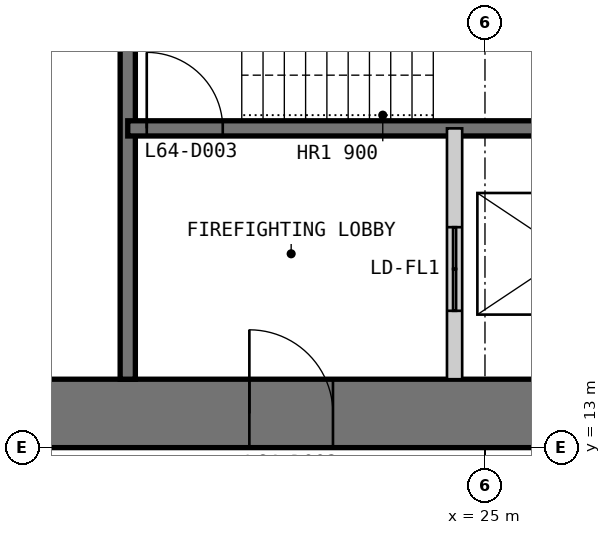
"""IFC4 building model, lengths in metres.
Left out: names, types, materials, properties, quantities, classifications, styles, units other than length and angle.
Written with IfcOpenShell. Run it as: python <this file> out.ifc"""

import sys

from ifc_helpers import new_model, si_unit, direction, frame, frame_2d, origin, place, context, subcontext, project, spatial, polyline, rectangle, outline, extrude, element, fill, save


model = new_model("IFC4")
c1 = context("Model", 3, precision=1e-05, world=origin(), true_north=direction((0.0, 1.0)))
c2 = subcontext(c1, "Body", "Model", "MODEL_VIEW")
j1 = project(units=[si_unit("LENGTHUNIT", "METRE"), si_unit("PLANEANGLEUNIT", "RADIAN")], contexts=[c1])
p1 = place(None, origin())
s1 = spatial("IfcSite", under=j1, at=p1, CompositionType="ELEMENT")
p2 = place(p1, origin())
s2 = spatial("IfcBuilding", under=s1, at=p2, CompositionType="ELEMENT")
p3 = place(p2, frame((0.0, 0.0, 269.6)))
s3 = spatial("IfcBuildingStorey", under=s2, at=p3, CompositionType="ELEMENT", Elevation=269.6)
p4 = place(p3, frame((13.0, 13.45, 0.0), z_axis=(0.0, 0.0, 1.0), x_axis=(1.0, 0.0, 0.0)))
e1 = element("IfcWall", 1, at=p4, inside=s3, PredefinedType="SHEAR", context=c2, shape_type="SweptSolid", body=[
    extrude(outline(polyline([(0.0, -0.45), (24.0, -0.45), (23.1, 0.45), (0.9, 0.45), (0.0, -0.45)])), origin(), (0.0, 0.0, 1.0), 3.4),
])
p5 = place(p4, frame((4.9, 0.0, 0.0)))
e2 = element("IfcOpeningElement", 2, at=p5, cuts=e1, PredefinedType="OPENING", context=c2, shape_type="SweptSolid", body=[
    extrude(rectangle(XDim=1.0, YDim=2.2, at=frame_2d((0.5, 1.1))), frame((0.0, 0.46, 0.0), z_axis=(0.0, -1.0, 0.0), x_axis=(1.0, 0.0, 0.0)), (0.0, 0.0, 1.0), 0.92),
])
p6 = place(p4, frame((8.9, 0.0, 0.0)))
e3 = element("IfcOpeningElement", 3, at=p6, cuts=e1, PredefinedType="OPENING", context=c2, shape_type="SweptSolid", body=[
    extrude(rectangle(XDim=1.1, YDim=2.2, at=frame_2d((0.55, 1.1))), frame((0.0, 0.46, 0.0), z_axis=(0.0, -1.0, 0.0), x_axis=(1.0, 0.0, 0.0)), (0.0, 0.0, 1.0), 0.92),
])
p7 = place(p4, frame((15.05, 0.0, 0.0)))
e4 = element("IfcOpeningElement", 4, at=p7, cuts=e1, PredefinedType="OPENING", context=c2, shape_type="SweptSolid", body=[
    extrude(rectangle(XDim=0.9, YDim=2.2, at=frame_2d((0.45, 1.1))), frame((0.0, 0.46, 0.0), z_axis=(0.0, -1.0, 0.0), x_axis=(1.0, 0.0, 0.0)), (0.0, 0.0, 1.0), 0.92),
])
p8 = place(p4, frame((17.9, 0.0, 0.0)))
e5 = element("IfcOpeningElement", 5, at=p8, cuts=e1, PredefinedType="OPENING", context=c2, shape_type="SweptSolid", body=[
    extrude(rectangle(XDim=1.0, YDim=2.2, at=frame_2d((0.5, 1.1))), frame((0.0, 0.46, 0.0), z_axis=(0.0, -1.0, 0.0), x_axis=(1.0, 0.0, 0.0)), (0.0, 0.0, 1.0), 0.92),
])
p9 = place(p4, frame((21.4, 0.0, 0.0)))
e6 = element("IfcOpeningElement", 6, at=p9, cuts=e1, PredefinedType="OPENING", context=c2, shape_type="SweptSolid", body=[
    extrude(rectangle(XDim=1.0, YDim=2.2, at=frame_2d((0.5, 1.1))), frame((0.0, 0.46, 0.0), z_axis=(0.0, -1.0, 0.0), x_axis=(1.0, 0.0, 0.0)), (0.0, 0.0, 1.0), 0.92),
])
p10 = place(p3, frame((20.3, 13.9, 0.0), z_axis=(0.0, 0.0, 1.0), x_axis=(0.0, 1.0, 0.0)))
e7 = element("IfcWall", 7, at=p10, inside=s3, PredefinedType="SOLIDWALL", context=c2, shape_type="SweptSolid", body=[
    extrude(rectangle(XDim=16.1, YDim=0.2, at=frame_2d((8.05, 0.0))), origin(), (0.0, 0.0, 1.0), 3.2),
])
p11 = place(p10, frame((7.85, 0.0, 0.0)))
e8 = element("IfcOpeningElement", 8, at=p11, cuts=e7, PredefinedType="OPENING", context=c2, shape_type="SweptSolid", body=[
    extrude(rectangle(XDim=0.9, YDim=2.2, at=frame_2d((0.45, 1.1))), frame((0.0, 0.11, 0.0), z_axis=(0.0, -1.0, 0.0), x_axis=(1.0, 0.0, 0.0)), (0.0, 0.0, 1.0), 0.22),
])
p12 = place(p10, frame((11.75, 0.0, 0.0)))
e9 = element("IfcOpeningElement", 9, at=p12, cuts=e7, PredefinedType="OPENING", context=c2, shape_type="SweptSolid", body=[
    extrude(rectangle(XDim=0.9, YDim=2.2, at=frame_2d((0.45, 1.1))), frame((0.0, 0.11, 0.0), z_axis=(0.0, -1.0, 0.0), x_axis=(1.0, 0.0, 0.0)), (0.0, 0.0, 1.0), 0.22),
])
p13 = place(p10, frame((14.5, 0.0, 0.0)))
e10 = element("IfcOpeningElement", 10, at=p13, cuts=e7, PredefinedType="OPENING", context=c2, shape_type="SweptSolid", body=[
    extrude(rectangle(XDim=1.0, YDim=2.2, at=frame_2d((0.5, 1.1))), frame((0.0, 0.11, 0.0), z_axis=(0.0, -1.0, 0.0), x_axis=(1.0, 0.0, 0.0)), (0.0, 0.0, 1.0), 0.22),
])
p14 = place(p3, frame((20.3, 17.2, 0.0), z_axis=(0.0, 0.0, 1.0), x_axis=(1.0, 0.0, 0.0)))
e11 = element("IfcWall", 11, at=p14, inside=s3, PredefinedType="SOLIDWALL", context=c2, shape_type="SweptSolid", body=[
    extrude(rectangle(XDim=9.4, YDim=0.2, at=frame_2d((4.7, 0.0))), origin(), (0.0, 0.0, 1.0), 3.2),
])
p15 = place(p14, frame((0.25, 0.0, 0.0)))
e12 = element("IfcOpeningElement", 12, at=p15, cuts=e11, PredefinedType="OPENING", context=c2, shape_type="SweptSolid", body=[
    extrude(rectangle(XDim=1.0, YDim=2.2, at=frame_2d((0.5, 1.1))), frame((0.0, 0.11, 0.0), z_axis=(0.0, -1.0, 0.0), x_axis=(1.0, 0.0, 0.0)), (0.0, 0.0, 1.0), 0.22),
])
p16 = place(p3, frame((24.6, 13.9, 0.0), z_axis=(0.0, 0.0, 1.0), x_axis=(0.0, 1.0, 0.0)))
e13 = element("IfcWall", 13, at=p16, inside=s3, PredefinedType="PARTITIONING", context=c2, shape_type="SweptSolid", body=[
    extrude(rectangle(XDim=3.3, YDim=0.2, at=frame_2d((1.65, 0.0))), origin(), (0.0, 0.0, 1.0), 3.2),
])
p17 = place(p16, frame((0.9, 0.0, 0.0)))
e14 = element("IfcOpeningElement", 14, at=p17, cuts=e13, PredefinedType="OPENING", context=c2, shape_type="SweptSolid", body=[
    extrude(rectangle(XDim=1.1, YDim=2.2, at=frame_2d((0.55, 1.1))), frame((0.0, 0.11, 0.0), z_axis=(0.0, -1.0, 0.0), x_axis=(1.0, 0.0, 0.0)), (0.0, 0.0, 1.0), 0.22),
])
p18 = place(p6, origin())
e15 = element("IfcDoor", 15, at=p18, inside=s3, OperationType="SINGLE_SWING_LEFT", PredefinedType="DOOR", context=c2, shape_type="SweptSolid", body=[
    extrude(rectangle(XDim=1.1, YDim=2.2, at=frame_2d((0.55, 1.1))), frame((0.0, 0.025, 0.0), z_axis=(0.0, -1.0, 0.0), x_axis=(1.0, 0.0, 0.0)), (0.0, 0.0, 1.0), 0.05),
    extrude(outline(polyline([(0.0, 0.0), (0.04, 0.0), (0.04, 2.16), (1.06, 2.16), (1.06, 0.0), (1.1, 0.0), (1.1, 2.2), (0.0, 2.2), (0.0, 0.0)])), frame((0.0, 0.3, 0.0), z_axis=(0.0, -1.0, 0.0), x_axis=(1.0, 0.0, 0.0)), (0.0, 0.0, 1.0), 0.6),
])
fill(e3, e15)
p19 = place(p15, origin())
e16 = element("IfcDoor", 16, at=p19, inside=s3, OperationType="SINGLE_SWING_LEFT", PredefinedType="DOOR", context=c2, shape_type="SweptSolid", body=[
    extrude(rectangle(XDim=1.0, YDim=2.2, at=frame_2d((0.5, 1.1))), frame((0.0, 0.025, 0.0), z_axis=(0.0, -1.0, 0.0), x_axis=(1.0, 0.0, 0.0)), (0.0, 0.0, 1.0), 0.05),
])
fill(e12, e16)
p20 = place(p17, origin())
e17 = element("IfcDoor", 17, at=p20, inside=s3, OperationType="DOUBLE_DOOR_SLIDING", PredefinedType="DOOR", context=c2, shape_type="SweptSolid", body=[
    extrude(rectangle(XDim=1.1, YDim=2.2, at=frame_2d((0.55, 1.1))), frame((0.0, 0.025, 0.0), z_axis=(0.0, -1.0, 0.0), x_axis=(1.0, 0.0, 0.0)), (0.0, 0.0, 1.0), 0.05),
])
fill(e14, e17)
save(model, sys.argv[1])
